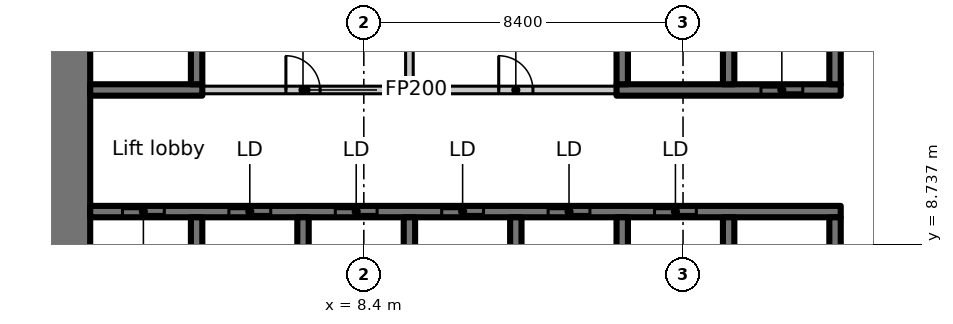
"""IFC4 building model, lengths in metres.
Left out: names, types, materials, properties, quantities, classifications, styles, units other than length and angle.
Written with IfcOpenShell. Run it as: python <this file> out.ifc"""

import sys

from ifc_helpers import new_model, si_unit, direction, frame, frame_2d, origin, place, context, subcontext, project, spatial, rectangle, extrude, element, fill, save


model = new_model("IFC4")
c1 = context("Model", 3, precision=1e-05, world=origin(), true_north=direction((0.0, 1.0)))
c2 = subcontext(c1, "Body", "Model", "MODEL_VIEW")
j1 = project(units=[si_unit("LENGTHUNIT", "METRE"), si_unit("PLANEANGLEUNIT", "RADIAN")], contexts=[c1])
p1 = place(None, origin())
s1 = spatial("IfcSite", under=j1, at=p1, CompositionType="ELEMENT")
p2 = place(p1, origin())
s2 = spatial("IfcBuilding", under=s1, at=p2, CompositionType="ELEMENT")
p3 = place(p2, frame((0.0, 0.0, 12.5)))
s3 = spatial("IfcBuildingStorey", under=s2, at=p3, CompositionType="ELEMENT", Elevation=12.5)
p4 = place(p3, frame((0.6, 6.736, 0.0), z_axis=(0.0, 0.0, 1.0), x_axis=(0.0, 1.0, 0.0)))
e1 = element("IfcWall", 1, at=p4, inside=s3, PredefinedType="SHEAR", context=c2, shape_type="SweptSolid", body=[
    extrude(rectangle(XDim=8.864, YDim=1.2, at=frame_2d((4.432, 0.0))), origin(), (0.0, 0.0, 1.0), 7.25),
])
p5 = place(p3, frame((1.2, 9.6, 0.0), z_axis=(0.0, 0.0, 1.0), x_axis=(1.0, 0.0, 0.0)))
e2 = element("IfcWall", 2, at=p5, inside=s3, PredefinedType="SHEAR", context=c2, shape_type="SweptSolid", body=[
    extrude(rectangle(XDim=19.75, YDim=0.3, at=frame_2d((9.875, 0.0))), origin(), (0.0, 0.0, 1.0), 7.25),
])
p6 = place(p5, frame((0.85, 0.0, 0.0)))
e3 = element("IfcOpeningElement", 3, at=p6, cuts=e2, PredefinedType="OPENING", context=c2, shape_type="SweptSolid", body=[
    extrude(rectangle(XDim=1.1, YDim=2.3, at=frame_2d((0.55, 1.15))), frame((0.0, 0.16, 0.0), z_axis=(0.0, -1.0, 0.0), x_axis=(1.0, 0.0, 0.0)), (0.0, 0.0, 1.0), 0.32),
])
p7 = place(p5, frame((3.65, 0.0, 0.0)))
e4 = element("IfcOpeningElement", 4, at=p7, cuts=e2, PredefinedType="OPENING", context=c2, shape_type="SweptSolid", body=[
    extrude(rectangle(XDim=1.1, YDim=2.3, at=frame_2d((0.55, 1.15))), frame((0.0, 0.16, 0.0), z_axis=(0.0, -1.0, 0.0), x_axis=(1.0, 0.0, 0.0)), (0.0, 0.0, 1.0), 0.32),
])
p8 = place(p5, frame((6.45, 0.0, 0.0)))
e5 = element("IfcOpeningElement", 5, at=p8, cuts=e2, PredefinedType="OPENING", context=c2, shape_type="SweptSolid", body=[
    extrude(rectangle(XDim=1.1, YDim=2.3, at=frame_2d((0.55, 1.15))), frame((0.0, 0.16, 0.0), z_axis=(0.0, -1.0, 0.0), x_axis=(1.0, 0.0, 0.0)), (0.0, 0.0, 1.0), 0.32),
])
p9 = place(p5, frame((9.25, 0.0, 0.0)))
e6 = element("IfcOpeningElement", 6, at=p9, cuts=e2, PredefinedType="OPENING", context=c2, shape_type="SweptSolid", body=[
    extrude(rectangle(XDim=1.1, YDim=2.3, at=frame_2d((0.55, 1.15))), frame((0.0, 0.16, 0.0), z_axis=(0.0, -1.0, 0.0), x_axis=(1.0, 0.0, 0.0)), (0.0, 0.0, 1.0), 0.32),
])
p10 = place(p5, frame((12.05, 0.0, 0.0)))
e7 = element("IfcOpeningElement", 7, at=p10, cuts=e2, PredefinedType="OPENING", context=c2, shape_type="SweptSolid", body=[
    extrude(rectangle(XDim=1.1, YDim=2.3, at=frame_2d((0.55, 1.15))), frame((0.0, 0.16, 0.0), z_axis=(0.0, -1.0, 0.0), x_axis=(1.0, 0.0, 0.0)), (0.0, 0.0, 1.0), 0.32),
])
p11 = place(p5, frame((14.85, 0.0, 0.0)))
e8 = element("IfcOpeningElement", 8, at=p11, cuts=e2, PredefinedType="OPENING", context=c2, shape_type="SweptSolid", body=[
    extrude(rectangle(XDim=1.1, YDim=2.3, at=frame_2d((0.55, 1.15))), frame((0.0, 0.16, 0.0), z_axis=(0.0, -1.0, 0.0), x_axis=(1.0, 0.0, 0.0)), (0.0, 0.0, 1.0), 0.32),
])
for number, where, z_axis, x_axis in (
    (9, (4.0, 7.15, 0.0), (0.0, 0.0, 1.0), (0.0, 1.0, 0.0)),
    (10, (6.8, 7.15, 0.0), (0.0, 0.0, 1.0), (0.0, 1.0, 0.0)),
    (11, (9.6, 7.15, 0.0), (0.0, 0.0, 1.0), (0.0, 1.0, 0.0)),
    (12, (12.4, 7.15, 0.0), (0.0, 0.0, 1.0), (0.0, 1.0, 0.0)),
    (13, (15.2, 7.15, 0.0), (0.0, 0.0, 1.0), (0.0, 1.0, 0.0)),
    (14, (18.0, 7.15, 0.0), (0.0, 0.0, 1.0), (0.0, 1.0, 0.0)),
    (15, (20.8, 7.15, 0.0), (0.0, 0.0, 1.0), (0.0, 1.0, 0.0)),
):
    element("IfcWall", number, at=place(p3, frame(where, z_axis=z_axis, x_axis=x_axis)), inside=s3, PredefinedType="SHEAR", context=c2, shape_type="SweptSolid", body=[
        extrude(rectangle(XDim=2.3, YDim=0.3, at=frame_2d((1.15, 0.0))), origin(), (0.0, 0.0, 1.0), 7.25),
    ])
p12 = place(p3, frame((1.2, 12.8, 0.0), z_axis=(0.0, 0.0, 1.0), x_axis=(1.0, 0.0, 0.0)))
e16 = element("IfcWall", 16, at=p12, inside=s3, PredefinedType="SHEAR", context=c2, shape_type="SweptSolid", body=[
    extrude(rectangle(XDim=2.95, YDim=0.3, at=frame_2d((1.475, 0.0))), origin(), (0.0, 0.0, 1.0), 7.25),
])
p13 = place(p3, frame((4.0, 12.95, 0.0), z_axis=(0.0, 0.0, 1.0), x_axis=(0.0, 1.0, 0.0)))
e17 = element("IfcWall", 17, at=p13, inside=s3, PredefinedType="SHEAR", context=c2, shape_type="SweptSolid", body=[
    extrude(rectangle(XDim=2.65, YDim=0.3, at=frame_2d((1.325, 0.0))), origin(), (0.0, 0.0, 1.0), 7.25),
])
p14 = place(p3, frame((15.05, 12.8, 0.0), z_axis=(0.0, 0.0, 1.0), x_axis=(1.0, 0.0, 0.0)))
e18 = element("IfcWall", 18, at=p14, inside=s3, PredefinedType="SHEAR", context=c2, shape_type="SweptSolid", body=[
    extrude(rectangle(XDim=5.9, YDim=0.3, at=frame_2d((2.95, 0.0))), origin(), (0.0, 0.0, 1.0), 7.25),
])
p15 = place(p14, frame((3.8, 0.0, 0.0)))
e19 = element("IfcOpeningElement", 19, at=p15, cuts=e18, PredefinedType="OPENING", context=c2, shape_type="SweptSolid", body=[
    extrude(rectangle(XDim=1.1, YDim=2.3, at=frame_2d((0.55, 1.15))), frame((0.0, 0.16, 0.0), z_axis=(0.0, -1.0, 0.0), x_axis=(1.0, 0.0, 0.0)), (0.0, 0.0, 1.0), 0.32),
])
for number, where, z_axis, x_axis in (
    (20, (15.2, 12.95, 0.0), (0.0, 0.0, 1.0), (0.0, 1.0, 0.0)),
    (21, (18.0, 12.95, 0.0), (0.0, 0.0, 1.0), (0.0, 1.0, 0.0)),
    (22, (20.8, 12.95, 0.0), (0.0, 0.0, 1.0), (0.0, 1.0, 0.0)),
):
    element("IfcWall", number, at=place(p3, frame(where, z_axis=z_axis, x_axis=x_axis)), inside=s3, PredefinedType="SHEAR", context=c2, shape_type="SweptSolid", body=[
        extrude(rectangle(XDim=2.65, YDim=0.3, at=frame_2d((1.325, 0.0))), origin(), (0.0, 0.0, 1.0), 7.25),
    ])
p16 = place(p3, frame((4.162, 12.8, 0.0), z_axis=(0.0, 0.0, 1.0), x_axis=(1.0, 0.0, 0.0)))
e23 = element("IfcWall", 23, at=p16, inside=s3, PredefinedType="PARTITIONING", context=c2, shape_type="SweptSolid", body=[
    extrude(rectangle(XDim=5.438, YDim=0.2, at=frame_2d((2.719, 0.0))), origin(), (0.0, 0.0, 1.0), 7.25),
])
p17 = place(p16, frame((2.188, 0.0, 0.0)))
e24 = element("IfcOpeningElement", 24, at=p17, cuts=e23, PredefinedType="OPENING", context=c2, shape_type="SweptSolid", body=[
    extrude(rectangle(XDim=0.9, YDim=2.1, at=frame_2d((0.45, 1.05))), frame((0.0, 0.11, 0.0), z_axis=(0.0, -1.0, 0.0), x_axis=(1.0, 0.0, 0.0)), (0.0, 0.0, 1.0), 0.22),
])
p18 = place(p3, frame((9.6, 12.8, 0.0), z_axis=(0.0, 0.0, 1.0), x_axis=(1.0, 0.0, 0.0)))
e25 = element("IfcWall", 25, at=p18, inside=s3, PredefinedType="PARTITIONING", context=c2, shape_type="SweptSolid", body=[
    extrude(rectangle(XDim=5.438, YDim=0.2, at=frame_2d((2.719, 0.0))), origin(), (0.0, 0.0, 1.0), 7.25),
])
p19 = place(p18, frame((2.35, 0.0, 0.0)))
e26 = element("IfcOpeningElement", 26, at=p19, cuts=e25, PredefinedType="OPENING", context=c2, shape_type="SweptSolid", body=[
    extrude(rectangle(XDim=0.9, YDim=2.1, at=frame_2d((0.45, 1.05))), frame((0.0, 0.11, 0.0), z_axis=(0.0, -1.0, 0.0), x_axis=(1.0, 0.0, 0.0)), (0.0, 0.0, 1.0), 0.22),
])
p20 = place(p3, frame((9.6, 15.588, 0.0), z_axis=(0.0, 0.0, 1.0), x_axis=(0.0, -1.0, 0.0)))
e27 = element("IfcWall", 27, at=p20, inside=s3, PredefinedType="PARTITIONING", context=c2, shape_type="SweptSolid", body=[
    extrude(rectangle(XDim=2.688, YDim=0.2, at=frame_2d((1.344, 0.0))), origin(), (0.0, 0.0, 1.0), 7.25),
])
p21 = place(p6, origin())
e28 = element("IfcDoor", 28, at=p21, inside=s3, OperationType="SLIDING_TO_LEFT", PredefinedType="DOOR", context=c2, shape_type="SweptSolid", body=[
    extrude(rectangle(XDim=1.1, YDim=2.3, at=frame_2d((0.55, 1.15))), frame((0.0, 0.025, 0.0), z_axis=(0.0, -1.0, 0.0), x_axis=(1.0, 0.0, 0.0)), (0.0, 0.0, 1.0), 0.05),
])
fill(e3, e28)
p22 = place(p7, origin())
e29 = element("IfcDoor", 29, at=p22, inside=s3, OperationType="SLIDING_TO_LEFT", PredefinedType="DOOR", context=c2, shape_type="SweptSolid", body=[
    extrude(rectangle(XDim=1.1, YDim=2.3, at=frame_2d((0.55, 1.15))), frame((0.0, 0.025, 0.0), z_axis=(0.0, -1.0, 0.0), x_axis=(1.0, 0.0, 0.0)), (0.0, 0.0, 1.0), 0.05),
])
fill(e4, e29)
p23 = place(p8, origin())
e30 = element("IfcDoor", 30, at=p23, inside=s3, OperationType="SLIDING_TO_LEFT", PredefinedType="DOOR", context=c2, shape_type="SweptSolid", body=[
    extrude(rectangle(XDim=1.1, YDim=2.3, at=frame_2d((0.55, 1.15))), frame((0.0, 0.025, 0.0), z_axis=(0.0, -1.0, 0.0), x_axis=(1.0, 0.0, 0.0)), (0.0, 0.0, 1.0), 0.05),
])
fill(e5, e30)
p24 = place(p9, origin())
e31 = element("IfcDoor", 31, at=p24, inside=s3, OperationType="SLIDING_TO_LEFT", PredefinedType="DOOR", context=c2, shape_type="SweptSolid", body=[
    extrude(rectangle(XDim=1.1, YDim=2.3, at=frame_2d((0.55, 1.15))), frame((0.0, 0.025, 0.0), z_axis=(0.0, -1.0, 0.0), x_axis=(1.0, 0.0, 0.0)), (0.0, 0.0, 1.0), 0.05),
])
fill(e6, e31)
p25 = place(p10, origin())
e32 = element("IfcDoor", 32, at=p25, inside=s3, OperationType="SLIDING_TO_LEFT", PredefinedType="DOOR", context=c2, shape_type="SweptSolid", body=[
    extrude(rectangle(XDim=1.1, YDim=2.3, at=frame_2d((0.55, 1.15))), frame((0.0, 0.025, 0.0), z_axis=(0.0, -1.0, 0.0), x_axis=(1.0, 0.0, 0.0)), (0.0, 0.0, 1.0), 0.05),
])
fill(e7, e32)
p26 = place(p11, origin())
e33 = element("IfcDoor", 33, at=p26, inside=s3, OperationType="SLIDING_TO_LEFT", PredefinedType="DOOR", context=c2, shape_type="SweptSolid", body=[
    extrude(rectangle(XDim=1.1, YDim=2.3, at=frame_2d((0.55, 1.15))), frame((0.0, 0.025, 0.0), z_axis=(0.0, -1.0, 0.0), x_axis=(1.0, 0.0, 0.0)), (0.0, 0.0, 1.0), 0.05),
])
fill(e8, e33)
p27 = place(p15, origin())
e34 = element("IfcDoor", 34, at=p27, inside=s3, OperationType="SLIDING_TO_LEFT", PredefinedType="DOOR", context=c2, shape_type="SweptSolid", body=[
    extrude(rectangle(XDim=1.1, YDim=2.3, at=frame_2d((0.55, 1.15))), frame((0.0, 0.025, 0.0), z_axis=(0.0, -1.0, 0.0), x_axis=(1.0, 0.0, 0.0)), (0.0, 0.0, 1.0), 0.05),
])
fill(e19, e34)
p28 = place(p17, origin())
e35 = element("IfcDoor", 35, at=p28, inside=s3, OperationType="SINGLE_SWING_RIGHT", PredefinedType="DOOR", context=c2, shape_type="SweptSolid", body=[
    extrude(rectangle(XDim=0.9, YDim=2.1, at=frame_2d((0.45, 1.05))), frame((0.0, 0.025, 0.0), z_axis=(0.0, -1.0, 0.0), x_axis=(1.0, 0.0, 0.0)), (0.0, 0.0, 1.0), 0.05),
])
fill(e24, e35)
p29 = place(p19, origin())
e36 = element("IfcDoor", 36, at=p29, inside=s3, OperationType="SINGLE_SWING_LEFT", PredefinedType="DOOR", context=c2, shape_type="SweptSolid", body=[
    extrude(rectangle(XDim=0.9, YDim=2.1, at=frame_2d((0.45, 1.05))), frame((0.0, 0.025, 0.0), z_axis=(0.0, -1.0, 0.0), x_axis=(1.0, 0.0, 0.0)), (0.0, 0.0, 1.0), 0.05),
])
fill(e26, e36)
save(model, sys.argv[1])
